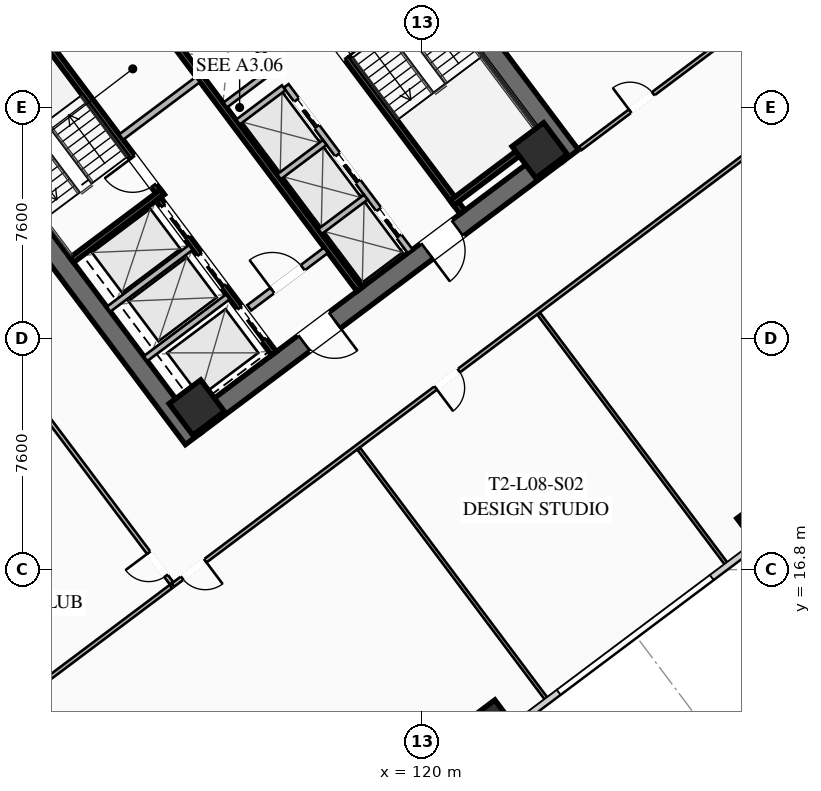
"""IFC4 building model, lengths in metres.
Left out: names, types, materials, properties, quantities, classifications, styles, units other than length and angle.
Written with IfcOpenShell. Run it as: python <this file> out.ifc"""

import sys

from ifc_helpers import new_model, si_unit, direction, frame, frame_2d, origin, origin_2d, place, context, subcontext, project, spatial, rectangle, hollow_rectangle, extrude, element, fill, save


model = new_model("IFC4")
c1 = context("Model", 3, precision=1e-05, world=origin(), true_north=direction((0.0, 1.0)))
c2 = subcontext(c1, "Body", "Model", "MODEL_VIEW")
j1 = project(units=[si_unit("LENGTHUNIT", "METRE"), si_unit("PLANEANGLEUNIT", "RADIAN")], contexts=[c1])
p1 = place(None, origin())
s1 = spatial("IfcSite", under=j1, at=p1, CompositionType="ELEMENT")
p2 = place(p1, origin())
s2 = spatial("IfcBuilding", under=s1, at=p2, CompositionType="ELEMENT")
p3 = place(p2, frame((0.0, 0.0, 35.25)))
s3 = spatial("IfcBuildingStorey", under=s2, at=p3, CompositionType="ELEMENT", Elevation=35.25)
for number, where, z_axis, x_axis in (
    (1, (112.476, 21.107, 0.0), (0.0, 0.0, 1.0), (-0.6, 0.8, 0.0)),
    (2, (115.524, 42.893, 0.0), (0.0, 0.0, 1.0), (0.6, -0.8, 0.0)),
):
    element("IfcWall", number, at=place(p3, frame(where, z_axis=z_axis, x_axis=x_axis)), inside=s3, PredefinedType="SHEAR", context=c2, shape_type="SweptSolid", body=[
        extrude(rectangle(XDim=15.6, YDim=0.65, at=frame_2d((7.8, 0.0))), origin(), (0.0, 0.0, 1.0), 3.55),
    ])
p4 = place(p3, frame((124.429, 30.478, 0.0), z_axis=(0.0, 0.0, 1.0), x_axis=(-0.799998028465, -0.600002628705, 0.0)))
e3 = element("IfcWall", 3, at=p4, inside=s3, PredefinedType="SHEAR", context=c2, shape_type="SweptSolid", body=[
    extrude(rectangle(XDim=14.86, YDim=0.65, at=frame_2d((7.43, 0.0))), origin(), (0.0, 0.0, 1.0), 3.55),
])
p5 = place(p4, frame((9.13, 0.0, 0.0)))
e4 = element("IfcOpeningElement", 4, at=p5, cuts=e3, PredefinedType="OPENING", context=c2, shape_type="SweptSolid", body=[
    extrude(rectangle(XDim=1.25, YDim=2.25, at=frame_2d((0.625, 1.125))), frame((0.0, 0.335, 0.0), z_axis=(0.0, -1.0, 0.0), x_axis=(1.0, 0.0, 0.0)), (0.0, 0.0, 1.0), 0.67),
])
p6 = place(p4, frame((4.08, 0.0, 0.0)))
e5 = element("IfcOpeningElement", 5, at=p6, cuts=e3, PredefinedType="OPENING", context=c2, shape_type="SweptSolid", body=[
    extrude(rectangle(XDim=1.25, YDim=2.25, at=frame_2d((0.625, 1.125))), frame((0.0, 0.335, 0.0), z_axis=(0.0, -1.0, 0.0), x_axis=(1.0, 0.0, 0.0)), (0.0, 0.0, 1.0), 0.67),
])
p7 = place(p3, frame((103.571, 33.522, 0.0), z_axis=(0.0, 0.0, 1.0), x_axis=(0.799998028465, 0.600002628705, 0.0)))
e6 = element("IfcWall", 6, at=p7, inside=s3, PredefinedType="SHEAR", context=c2, shape_type="SweptSolid", body=[
    extrude(rectangle(XDim=14.86, YDim=0.65, at=frame_2d((7.43, 0.0))), origin(), (0.0, 0.0, 1.0), 3.55),
])
p8 = place(p7, frame((4.48, 0.0, 0.0)))
e7 = element("IfcOpeningElement", 7, at=p8, cuts=e6, PredefinedType="OPENING", context=c2, shape_type="SweptSolid", body=[
    extrude(rectangle(XDim=1.25, YDim=2.25, at=frame_2d((0.625, 1.125))), frame((0.0, 0.335, 0.0), z_axis=(0.0, -1.0, 0.0), x_axis=(1.0, 0.0, 0.0)), (0.0, 0.0, 1.0), 0.67),
])
p9 = place(p7, frame((9.53, 0.0, 0.0)))
e8 = element("IfcOpeningElement", 8, at=p9, cuts=e6, PredefinedType="OPENING", context=c2, shape_type="SweptSolid", body=[
    extrude(rectangle(XDim=1.25, YDim=2.25, at=frame_2d((0.625, 1.125))), frame((0.0, 0.335, 0.0), z_axis=(0.0, -1.0, 0.0), x_axis=(1.0, 0.0, 0.0)), (0.0, 0.0, 1.0), 0.67),
])
for number, where, z_axis, x_axis in (
    (9, (112.59, 22.13, 0.0), (0.0, 0.0, 1.0), (0.8, 0.6, 0.0)),
    (10, (123.87, 30.59, 0.0), (0.0, 0.0, 1.0), (0.8, 0.6, 0.0)),
):
    element("IfcColumn", number, at=place(p3, frame(where, z_axis=z_axis, x_axis=x_axis)), inside=s3, PredefinedType="COLUMN", context=c2, shape_type="SweptSolid", body=[
        extrude(hollow_rectangle(XDim=1.3, YDim=1.3, WallThickness=0.05, at=origin_2d()), origin(), (0.0, 0.0, 1.0), 3.35),
    ])
for number, where, z_axis, x_axis in (
    (11, (122.31, 11.92, 0.0), (0.0, 0.0, 1.0), (0.8, 0.6, 0.0)),
    (12, (130.95, 18.4, 0.0), (0.0, 0.0, 1.0), (0.8, 0.6, 0.0)),
):
    element("IfcColumn", number, at=place(p3, frame(where, z_axis=z_axis, x_axis=x_axis)), inside=s3, PredefinedType="COLUMN", context=c2, shape_type="SweptSolid", body=[
        extrude(hollow_rectangle(XDim=0.85, YDim=0.85, WallThickness=0.035, at=origin_2d()), origin(), (0.0, 0.0, 1.0), 3.35),
    ])
p10 = place(p3, frame((111.44, 29.08, 0.0), z_axis=(0.0, 0.0, 1.0), x_axis=(-0.600009827119, 0.799992629566, 0.0)))
e13 = element("IfcWall", 13, at=p10, inside=s3, PredefinedType="SHEAR", context=c2, shape_type="SweptSolid", body=[
    extrude(rectangle(XDim=7.95, YDim=0.2, at=frame_2d((3.975, 0.0))), origin(), (0.0, 0.0, 1.0), 3.35),
])
p11 = place(p10, frame((0.45, 0.0, 0.0)))
e14 = element("IfcOpeningElement", 14, at=p11, cuts=e13, PredefinedType="OPENING", context=c2, shape_type="SweptSolid", body=[
    extrude(rectangle(XDim=1.15, YDim=2.2, at=frame_2d((0.575, 1.1))), frame((0.0, 0.11, 0.0), z_axis=(0.0, -1.0, 0.0), x_axis=(1.0, 0.0, 0.0)), (0.0, 0.0, 1.0), 0.22),
])
p12 = place(p3, frame((108.476, 26.982, 0.0), z_axis=(0.0, 0.0, 1.0), x_axis=(0.799984290658, 0.600020945218, 0.0)))
e15 = element("IfcWall", 15, at=p12, inside=s3, PredefinedType="SHEAR", context=c2, shape_type="SweptSolid", body=[
    extrude(rectangle(XDim=3.73, YDim=0.2, at=frame_2d((1.865, 0.0))), origin(), (0.0, 0.0, 1.0), 3.35),
])
p13 = place(p3, frame((116.56, 34.92, 0.0), z_axis=(0.0, 0.0, 1.0), x_axis=(0.600009827119, -0.799992629566, 0.0)))
e16 = element("IfcWall", 16, at=p13, inside=s3, PredefinedType="SHEAR", context=c2, shape_type="SweptSolid", body=[
    extrude(rectangle(XDim=7.95, YDim=0.2, at=frame_2d((3.975, 0.0))), origin(), (0.0, 0.0, 1.0), 3.35),
])
p14 = place(p13, frame((0.45, 0.0, 0.0)))
e17 = element("IfcOpeningElement", 17, at=p14, cuts=e16, PredefinedType="OPENING", context=c2, shape_type="SweptSolid", body=[
    extrude(rectangle(XDim=1.15, YDim=2.2, at=frame_2d((0.575, 1.1))), frame((0.0, 0.11, 0.0), z_axis=(0.0, -1.0, 0.0), x_axis=(1.0, 0.0, 0.0)), (0.0, 0.0, 1.0), 0.22),
])
p15 = place(p3, frame((120.98, 28.86, 0.0), z_axis=(0.0, 0.0, 1.0), x_axis=(0.800039270442, 0.59994763584, 0.0)))
e18 = element("IfcWall", 18, at=p15, inside=s3, PredefinedType="SHEAR", context=c2, shape_type="SweptSolid", body=[
    extrude(rectangle(XDim=3.73, YDim=0.2, at=frame_2d((1.865, 0.0))), origin(), (0.0, 0.0, 1.0), 3.35),
])
p16 = place(p3, frame((117.938, 26.016, 0.0), z_axis=(0.0, 0.0, 1.0), x_axis=(-0.600005463273, 0.799995902516, 0.0)))
e19 = element("IfcWall", 19, at=p16, inside=s3, PredefinedType="SHEAR", context=c2, shape_type="SweptSolid", body=[
    extrude(rectangle(XDim=14.3, YDim=0.2, at=frame_2d((7.15, 0.0))), origin(), (0.0, 0.0, 1.0), 3.35),
])
p17 = place(p3, frame((110.104, 31.028, 0.0), z_axis=(0.0, 0.0, 1.0), x_axis=(0.800018601094, 0.59997519774, 0.0)))
e20 = element("IfcWall", 20, at=p17, inside=s3, PredefinedType="SOLIDWALL", context=c2, shape_type="SweptSolid", body=[
    extrude(rectangle(XDim=3.15, YDim=0.22, at=frame_2d((1.575, 0.0))), origin(), (0.0, 0.0, 1.0), 2.703),
])
p18 = place(p3, frame((114.316, 25.412, 0.0), z_axis=(0.0, 0.0, 1.0), x_axis=(0.800018601094, 0.59997519774, 0.0)))
e21 = element("IfcWall", 21, at=p18, inside=s3, PredefinedType="SOLIDWALL", context=c2, shape_type="SweptSolid", body=[
    extrude(rectangle(XDim=3.15, YDim=0.22, at=frame_2d((1.575, 0.0))), origin(), (0.0, 0.0, 1.0), 2.703),
])
p19 = place(p18, frame((0.95, 0.0, 0.0)))
e22 = element("IfcOpeningElement", 22, at=p19, cuts=e21, PredefinedType="OPENING", context=c2, shape_type="SweptSolid", body=[
    extrude(rectangle(XDim=1.25, YDim=2.25, at=frame_2d((0.625, 1.125))), frame((0.0, 0.12, 0.0), z_axis=(0.0, -1.0, 0.0), x_axis=(1.0, 0.0, 0.0)), (0.0, 0.0, 1.0), 0.24),
])
p20 = place(p3, frame((115.13, 23.91, 0.0), z_axis=(0.0, 0.0, 1.0), x_axis=(-0.599975393228, 0.800018454488, 0.0)))
e23 = element("IfcWall", 23, at=p20, inside=s3, PredefinedType="SHEAR", context=c2, shape_type="SweptSolid", body=[
    extrude(rectangle(XDim=6.35, YDim=0.2, at=frame_2d((3.175, 0.0))), origin(), (0.0, 0.0, 1.0), 3.35),
])
p21 = place(p20, frame((4.775, 0.0, 0.0)))
e24 = element("IfcOpeningElement", 24, at=p21, cuts=e23, PredefinedType="OPENING", context=c2, shape_type="SweptSolid", body=[
    extrude(rectangle(XDim=1.3, YDim=2.25, at=frame_2d((0.65, 1.125))), frame((0.0, 0.11, 0.0), z_axis=(0.0, -1.0, 0.0), x_axis=(1.0, 0.0, 0.0)), (0.0, 0.0, 1.0), 0.22),
])
p22 = place(p20, frame((2.775, 0.0, 0.0)))
e25 = element("IfcOpeningElement", 25, at=p22, cuts=e23, PredefinedType="OPENING", context=c2, shape_type="SweptSolid", body=[
    extrude(rectangle(XDim=1.3, YDim=2.25, at=frame_2d((0.65, 1.125))), frame((0.0, 0.11, 0.0), z_axis=(0.0, -1.0, 0.0), x_axis=(1.0, 0.0, 0.0)), (0.0, 0.0, 1.0), 0.22),
])
p23 = place(p20, frame((0.575, 0.0, 0.0)))
e26 = element("IfcOpeningElement", 26, at=p23, cuts=e23, PredefinedType="OPENING", context=c2, shape_type="SweptSolid", body=[
    extrude(rectangle(XDim=1.3, YDim=2.25, at=frame_2d((0.65, 1.125))), frame((0.0, 0.11, 0.0), z_axis=(0.0, -1.0, 0.0), x_axis=(1.0, 0.0, 0.0)), (0.0, 0.0, 1.0), 0.22),
])
for number, where, z_axis, x_axis in (
    (27, (110.906, 23.742, 0.0), (0.0, 0.0, 1.0), (0.8, 0.6, 0.0)),
    (28, (109.688, 25.366, 0.0), (0.0, 0.0, 1.0), (0.8, 0.6, 0.0)),
):
    element("IfcWall", number, at=place(p3, frame(where, z_axis=z_axis, x_axis=x_axis)), inside=s3, PredefinedType="SOLIDWALL", context=c2, shape_type="SweptSolid", body=[
        extrude(rectangle(XDim=3.38, YDim=0.2, at=frame_2d((1.69, 0.0))), origin(), (0.0, 0.0, 1.0), 3.35),
    ])
p24 = place(p3, frame((119.61, 27.27, 0.0), z_axis=(0.0, 0.0, 1.0), x_axis=(-0.600011488909, 0.79999138319, 0.0)))
e29 = element("IfcWall", 29, at=p24, inside=s3, PredefinedType="SOLIDWALL", context=c2, shape_type="SweptSolid", body=[
    extrude(rectangle(XDim=6.8, YDim=0.2, at=frame_2d((3.4, 0.0))), origin(), (0.0, 0.0, 1.0), 3.35),
])
p25 = place(p24, frame((0.625, 0.0, 0.0)))
e30 = element("IfcOpeningElement", 30, at=p25, cuts=e29, PredefinedType="OPENING", context=c2, shape_type="SweptSolid", body=[
    extrude(rectangle(XDim=1.1, YDim=2.2, at=frame_2d((0.55, 1.1))), frame((0.0, 0.11, 0.0), z_axis=(0.0, -1.0, 0.0), x_axis=(1.0, 0.0, 0.0)), (0.0, 0.0, 1.0), 0.22),
])
p26 = place(p24, frame((2.875, 0.0, 0.0)))
e31 = element("IfcOpeningElement", 31, at=p26, cuts=e29, PredefinedType="OPENING", context=c2, shape_type="SweptSolid", body=[
    extrude(rectangle(XDim=1.1, YDim=2.2, at=frame_2d((0.55, 1.1))), frame((0.0, 0.11, 0.0), z_axis=(0.0, -1.0, 0.0), x_axis=(1.0, 0.0, 0.0)), (0.0, 0.0, 1.0), 0.22),
])
p27 = place(p24, frame((5.125, 0.0, 0.0)))
e32 = element("IfcOpeningElement", 32, at=p27, cuts=e29, PredefinedType="OPENING", context=c2, shape_type="SweptSolid", body=[
    extrude(rectangle(XDim=1.1, YDim=2.2, at=frame_2d((0.55, 1.1))), frame((0.0, 0.11, 0.0), z_axis=(0.0, -1.0, 0.0), x_axis=(1.0, 0.0, 0.0)), (0.0, 0.0, 1.0), 0.22),
])
p28 = place(p3, frame((116.646, 27.922, 0.0), z_axis=(0.0, 0.0, 1.0), x_axis=(0.8, 0.6, 0.0)))
e33 = element("IfcWall", 33, at=p28, inside=s3, PredefinedType="SOLIDWALL", context=c2, shape_type="SweptSolid", body=[
    extrude(rectangle(XDim=1.88, YDim=0.2, at=frame_2d((0.94, 0.0))), origin(), (0.0, 0.0, 1.0), 3.35),
])
p29 = place(p3, frame((115.296, 29.722, 0.0), z_axis=(0.0, 0.0, 1.0), x_axis=(0.799984418148, 0.600020775241, 0.0)))
e34 = element("IfcWall", 34, at=p29, inside=s3, PredefinedType="SOLIDWALL", context=c2, shape_type="SweptSolid", body=[
    extrude(rectangle(XDim=1.88, YDim=0.2, at=frame_2d((0.94, 0.0))), origin(), (0.0, 0.0, 1.0), 3.35),
])
p30 = place(p3, frame((113.946, 31.522, 0.0), z_axis=(0.0, 0.0, 1.0), x_axis=(0.8, 0.6, 0.0)))
e35 = element("IfcWall", 35, at=p30, inside=s3, PredefinedType="SOLIDWALL", context=c2, shape_type="SweptSolid", body=[
    extrude(rectangle(XDim=1.88, YDim=0.2, at=frame_2d((0.94, 0.0))), origin(), (0.0, 0.0, 1.0), 3.35),
])
p31 = place(p3, frame((115.11, 33.27, 0.0), z_axis=(0.0, 0.0, 1.0), x_axis=(-0.600011488909, 0.79999138319, 0.0)))
e36 = element("IfcWall", 36, at=p31, inside=s3, PredefinedType="SOLIDWALL", context=c2, shape_type="SweptSolid", body=[
    extrude(rectangle(XDim=6.8, YDim=0.2, at=frame_2d((3.4, 0.0))), origin(), (0.0, 0.0, 1.0), 3.35),
])
p32 = place(p3, frame((113.526, 32.082, 0.0), z_axis=(0.0, 0.0, 1.0), x_axis=(0.800046745961, 0.599937666993, 0.0)))
e37 = element("IfcWall", 37, at=p32, inside=s3, PredefinedType="SOLIDWALL", context=c2, shape_type="SweptSolid", body=[
    extrude(rectangle(XDim=1.88, YDim=0.2, at=frame_2d((0.94, 0.0))), origin(), (0.0, 0.0, 1.0), 3.35),
])
p33 = place(p3, frame((112.176, 33.882, 0.0), z_axis=(0.0, 0.0, 1.0), x_axis=(0.8, 0.6, 0.0)))
e38 = element("IfcWall", 38, at=p33, inside=s3, PredefinedType="SOLIDWALL", context=c2, shape_type="SweptSolid", body=[
    extrude(rectangle(XDim=1.88, YDim=0.2, at=frame_2d((0.94, 0.0))), origin(), (0.0, 0.0, 1.0), 3.35),
])
p34 = place(p3, frame((135.67, 34.19, 0.0), z_axis=(0.0, 0.0, 1.0), x_axis=(-0.800000982127, -0.599998690494, 0.0)))
e39 = element("IfcWall", 39, at=p34, inside=s3, PredefinedType="PARTITIONING", context=c2, shape_type="SweptSolid", body=[
    extrude(rectangle(XDim=29.83, YDim=0.135, at=frame_2d((14.915, 0.0))), origin(), (0.0, 0.0, 1.0), 2.703),
])
p35 = place(p34, frame((28.5, 0.0, 0.0)))
e40 = element("IfcOpeningElement", 40, at=p35, cuts=e39, PredefinedType="OPENING", context=c2, shape_type="SweptSolid", body=[
    extrude(rectangle(XDim=0.95, YDim=2.05, at=frame_2d((0.475, 1.025))), frame((0.0, 0.077, 0.0), z_axis=(0.0, -1.0, 0.0), x_axis=(1.0, 0.0, 0.0)), (0.0, 0.0, 1.0), 0.155),
])
p36 = place(p34, frame((18.075, 0.0, 0.0)))
e41 = element("IfcOpeningElement", 41, at=p36, cuts=e39, PredefinedType="OPENING", context=c2, shape_type="SweptSolid", body=[
    extrude(rectangle(XDim=0.95, YDim=2.05, at=frame_2d((0.475, 1.025))), frame((0.0, 0.077, 0.0), z_axis=(0.0, -1.0, 0.0), x_axis=(1.0, 0.0, 0.0)), (0.0, 0.0, 1.0), 0.155),
])
p37 = place(p34, frame((0.38, 0.0, 0.0)))
e42 = element("IfcOpeningElement", 42, at=p37, cuts=e39, PredefinedType="OPENING", context=c2, shape_type="SweptSolid", body=[
    extrude(rectangle(XDim=0.95, YDim=2.05, at=frame_2d((0.475, 1.025))), frame((0.0, 0.077, 0.0), z_axis=(0.0, -1.0, 0.0), x_axis=(1.0, 0.0, 0.0)), (0.0, 0.0, 1.0), 0.155),
])
p38 = place(p3, frame((124.128, 12.496, 0.0), z_axis=(0.0, 0.0, 1.0), x_axis=(-0.600007548425, 0.799994338626, 0.0)))
e43 = element("IfcWall", 43, at=p38, inside=s3, PredefinedType="PARTITIONING", context=c2, shape_type="SweptSolid", body=[
    extrude(rectangle(XDim=10.35, YDim=0.11, at=frame_2d((5.175, 0.0))), origin(), (0.0, 0.0, 1.0), 2.703),
])
p39 = place(p3, frame((130.048, 16.936, 0.0), z_axis=(0.0, 0.0, 1.0), x_axis=(-0.600011322243, 0.799991508192, 0.0)))
e44 = element("IfcWall", 44, at=p39, inside=s3, PredefinedType="PARTITIONING", context=c2, shape_type="SweptSolid", body=[
    extrude(rectangle(XDim=10.35, YDim=0.11, at=frame_2d((5.175, 0.0))), origin(), (0.0, 0.0, 1.0), 2.703),
])
p40 = place(p3, frame((125.208, 30.656, 0.0), z_axis=(0.0, 0.0, 1.0), x_axis=(0.799995666112, 0.600005778473, 0.0)))
e45 = element("IfcWall", 45, at=p40, inside=s3, PredefinedType="PARTITIONING", context=c2, shape_type="SweptSolid", body=[
    extrude(rectangle(XDim=13.52, YDim=0.135, at=frame_2d((6.76, 0.0))), origin(), (0.0, 0.0, 1.0), 2.703),
])
p41 = place(p40, frame((2.045, 0.0, 0.0)))
e46 = element("IfcOpeningElement", 46, at=p41, cuts=e45, PredefinedType="OPENING", context=c2, shape_type="SweptSolid", body=[
    extrude(rectangle(XDim=0.95, YDim=2.05, at=frame_2d((0.475, 1.025))), frame((0.0, 0.077, 0.0), z_axis=(0.0, -1.0, 0.0), x_axis=(1.0, 0.0, 0.0)), (0.0, 0.0, 1.0), 0.155),
])
p42 = place(p3, frame((111.758, 16.356, 0.0), z_axis=(0.0, 0.0, 1.0), x_axis=(-0.600001776367, 0.799998667722, 0.0)))
e47 = element("IfcWall", 47, at=p42, inside=s3, PredefinedType="PARTITIONING", context=c2, shape_type="SweptSolid", body=[
    extrude(rectangle(XDim=21.99, YDim=0.135, at=frame_2d((10.995, 0.0))), origin(), (0.0, 0.0, 1.0), 2.703),
])
p43 = place(p42, frame((0.3, 0.0, 0.0)))
e48 = element("IfcOpeningElement", 48, at=p43, cuts=e47, PredefinedType="OPENING", context=c2, shape_type="SweptSolid", body=[
    extrude(rectangle(XDim=0.95, YDim=2.05, at=frame_2d((0.475, 1.025))), frame((0.0, 0.077, 0.0), z_axis=(0.0, -1.0, 0.0), x_axis=(1.0, 0.0, 0.0)), (0.0, 0.0, 1.0), 0.155),
])
p44 = place(p42, frame((10.952, 0.0, 0.0)))
e49 = element("IfcOpeningElement", 49, at=p44, cuts=e47, PredefinedType="OPENING", context=c2, shape_type="SweptSolid", body=[
    extrude(rectangle(XDim=0.95, YDim=2.05, at=frame_2d((0.475, 1.025))), frame((0.0, 0.077, 0.0), z_axis=(0.0, -1.0, 0.0), x_axis=(1.0, 0.0, 0.0)), (0.0, 0.0, 1.0), 0.155),
])
p45 = place(p42, frame((20.74, 0.0, 0.0)))
e50 = element("IfcOpeningElement", 50, at=p45, cuts=e47, PredefinedType="OPENING", context=c2, shape_type="SweptSolid", body=[
    extrude(rectangle(XDim=0.95, YDim=2.05, at=frame_2d((0.475, 1.025))), frame((0.0, 0.077, 0.0), z_axis=(0.0, -1.0, 0.0), x_axis=(1.0, 0.0, 0.0)), (0.0, 0.0, 1.0), 0.155),
])
p46 = place(p3, frame((103.406, 9.992, 0.0), z_axis=(0.0, 0.0, 1.0), x_axis=(0.8, 0.6, 0.0)))
e51 = element("IfcWall", 51, at=p46, inside=s3, PredefinedType="PARTITIONING", context=c2, shape_type="SweptSolid", body=[
    extrude(rectangle(XDim=10.42, YDim=0.135, at=frame_2d((5.21, 0.0))), origin(), (0.0, 0.0, 1.0), 2.703),
])
p47 = place(p5, origin())
e52 = element("IfcDoor", 52, at=p47, inside=s3, OperationType="SINGLE_SWING_LEFT", PredefinedType="DOOR", context=c2, shape_type="SweptSolid", body=[
    extrude(rectangle(XDim=1.25, YDim=2.25, at=frame_2d((0.625, 1.125))), frame((0.0, 0.025, 0.0), z_axis=(0.0, -1.0, 0.0), x_axis=(1.0, 0.0, 0.0)), (0.0, 0.0, 1.0), 0.05),
])
fill(e4, e52)
p48 = place(p6, origin())
e53 = element("IfcDoor", 53, at=p48, inside=s3, OperationType="SINGLE_SWING_RIGHT", PredefinedType="DOOR", context=c2, shape_type="SweptSolid", body=[
    extrude(rectangle(XDim=1.25, YDim=2.25, at=frame_2d((0.625, 1.125))), frame((0.0, 0.025, 0.0), z_axis=(0.0, -1.0, 0.0), x_axis=(1.0, 0.0, 0.0)), (0.0, 0.0, 1.0), 0.05),
])
fill(e5, e53)
p49 = place(p11, origin())
e54 = element("IfcDoor", 54, at=p49, inside=s3, OperationType="SINGLE_SWING_RIGHT", PredefinedType="DOOR", context=c2, shape_type="SweptSolid", body=[
    extrude(rectangle(XDim=1.15, YDim=2.2, at=frame_2d((0.575, 1.1))), frame((0.0, 0.025, 0.0), z_axis=(0.0, -1.0, 0.0), x_axis=(1.0, 0.0, 0.0)), (0.0, 0.0, 1.0), 0.05),
])
fill(e14, e54)
p50 = place(p14, origin())
e55 = element("IfcDoor", 55, at=p50, inside=s3, OperationType="SINGLE_SWING_RIGHT", PredefinedType="DOOR", context=c2, shape_type="SweptSolid", body=[
    extrude(rectangle(XDim=1.15, YDim=2.2, at=frame_2d((0.575, 1.1))), frame((0.0, 0.025, 0.0), z_axis=(0.0, -1.0, 0.0), x_axis=(1.0, 0.0, 0.0)), (0.0, 0.0, 1.0), 0.05),
])
fill(e17, e55)
p51 = place(p19, origin())
e56 = element("IfcDoor", 56, at=p51, inside=s3, OperationType="SINGLE_SWING_LEFT", PredefinedType="DOOR", context=c2, shape_type="SweptSolid", body=[
    extrude(rectangle(XDim=1.25, YDim=2.25, at=frame_2d((0.625, 1.125))), frame((0.0, 0.025, 0.0), z_axis=(0.0, -1.0, 0.0), x_axis=(1.0, 0.0, 0.0)), (0.0, 0.0, 1.0), 0.05),
])
fill(e22, e56)
p52 = place(p35, origin())
e57 = element("IfcDoor", 57, at=p52, inside=s3, OperationType="SINGLE_SWING_LEFT", PredefinedType="DOOR", context=c2, shape_type="SweptSolid", body=[
    extrude(rectangle(XDim=0.95, YDim=2.05, at=frame_2d((0.475, 1.025))), frame((0.0, 0.025, 0.0), z_axis=(0.0, -1.0, 0.0), x_axis=(1.0, 0.0, 0.0)), (0.0, 0.0, 1.0), 0.05),
])
fill(e40, e57)
p53 = place(p36, origin())
e58 = element("IfcDoor", 58, at=p53, inside=s3, OperationType="SINGLE_SWING_RIGHT", PredefinedType="DOOR", context=c2, shape_type="SweptSolid", body=[
    extrude(rectangle(XDim=0.95, YDim=2.05, at=frame_2d((0.475, 1.025))), frame((0.0, 0.025, 0.0), z_axis=(0.0, -1.0, 0.0), x_axis=(1.0, 0.0, 0.0)), (0.0, 0.0, 1.0), 0.05),
])
fill(e41, e58)
p54 = place(p41, origin())
e59 = element("IfcDoor", 59, at=p54, inside=s3, OperationType="SINGLE_SWING_LEFT", PredefinedType="DOOR", context=c2, shape_type="SweptSolid", body=[
    extrude(rectangle(XDim=0.95, YDim=2.05, at=frame_2d((0.475, 1.025))), frame((0.0, 0.025, 0.0), z_axis=(0.0, -1.0, 0.0), x_axis=(1.0, 0.0, 0.0)), (0.0, 0.0, 1.0), 0.05),
])
fill(e46, e59)
p55 = place(p43, origin())
e60 = element("IfcDoor", 60, at=p55, inside=s3, OperationType="SINGLE_SWING_RIGHT", PredefinedType="DOOR", context=c2, shape_type="SweptSolid", body=[
    extrude(rectangle(XDim=0.95, YDim=2.05, at=frame_2d((0.475, 1.025))), frame((0.0, 0.025, 0.0), z_axis=(0.0, -1.0, 0.0), x_axis=(1.0, 0.0, 0.0)), (0.0, 0.0, 1.0), 0.05),
])
fill(e48, e60)
p56 = place(p21, origin())
e61 = element("IfcDoor", 61, at=p56, inside=s3, OperationType="SLIDING_TO_LEFT", PredefinedType="DOOR", context=c2, shape_type="SweptSolid", body=[
    extrude(rectangle(XDim=1.3, YDim=2.25, at=frame_2d((0.65, 1.125))), frame((0.0, 0.025, 0.0), z_axis=(0.0, -1.0, 0.0), x_axis=(1.0, 0.0, 0.0)), (0.0, 0.0, 1.0), 0.05),
])
fill(e24, e61)
p57 = place(p22, origin())
e62 = element("IfcDoor", 62, at=p57, inside=s3, OperationType="SLIDING_TO_LEFT", PredefinedType="DOOR", context=c2, shape_type="SweptSolid", body=[
    extrude(rectangle(XDim=1.3, YDim=2.25, at=frame_2d((0.65, 1.125))), frame((0.0, 0.025, 0.0), z_axis=(0.0, -1.0, 0.0), x_axis=(1.0, 0.0, 0.0)), (0.0, 0.0, 1.0), 0.05),
])
fill(e25, e62)
p58 = place(p23, origin())
e63 = element("IfcDoor", 63, at=p58, inside=s3, OperationType="SLIDING_TO_LEFT", PredefinedType="DOOR", context=c2, shape_type="SweptSolid", body=[
    extrude(rectangle(XDim=1.3, YDim=2.25, at=frame_2d((0.65, 1.125))), frame((0.0, 0.025, 0.0), z_axis=(0.0, -1.0, 0.0), x_axis=(1.0, 0.0, 0.0)), (0.0, 0.0, 1.0), 0.05),
])
fill(e26, e63)
p59 = place(p25, origin())
e64 = element("IfcDoor", 64, at=p59, inside=s3, OperationType="SLIDING_TO_LEFT", PredefinedType="DOOR", context=c2, shape_type="SweptSolid", body=[
    extrude(rectangle(XDim=1.1, YDim=2.2, at=frame_2d((0.55, 1.1))), frame((0.0, 0.025, 0.0), z_axis=(0.0, -1.0, 0.0), x_axis=(1.0, 0.0, 0.0)), (0.0, 0.0, 1.0), 0.05),
])
fill(e30, e64)
p60 = place(p26, origin())
e65 = element("IfcDoor", 65, at=p60, inside=s3, OperationType="SLIDING_TO_LEFT", PredefinedType="DOOR", context=c2, shape_type="SweptSolid", body=[
    extrude(rectangle(XDim=1.1, YDim=2.2, at=frame_2d((0.55, 1.1))), frame((0.0, 0.025, 0.0), z_axis=(0.0, -1.0, 0.0), x_axis=(1.0, 0.0, 0.0)), (0.0, 0.0, 1.0), 0.05),
])
fill(e31, e65)
p61 = place(p27, origin())
e66 = element("IfcDoor", 66, at=p61, inside=s3, OperationType="SLIDING_TO_LEFT", PredefinedType="DOOR", context=c2, shape_type="SweptSolid", body=[
    extrude(rectangle(XDim=1.1, YDim=2.2, at=frame_2d((0.55, 1.1))), frame((0.0, 0.025, 0.0), z_axis=(0.0, -1.0, 0.0), x_axis=(1.0, 0.0, 0.0)), (0.0, 0.0, 1.0), 0.05),
])
fill(e32, e66)
save(model, sys.argv[1])
